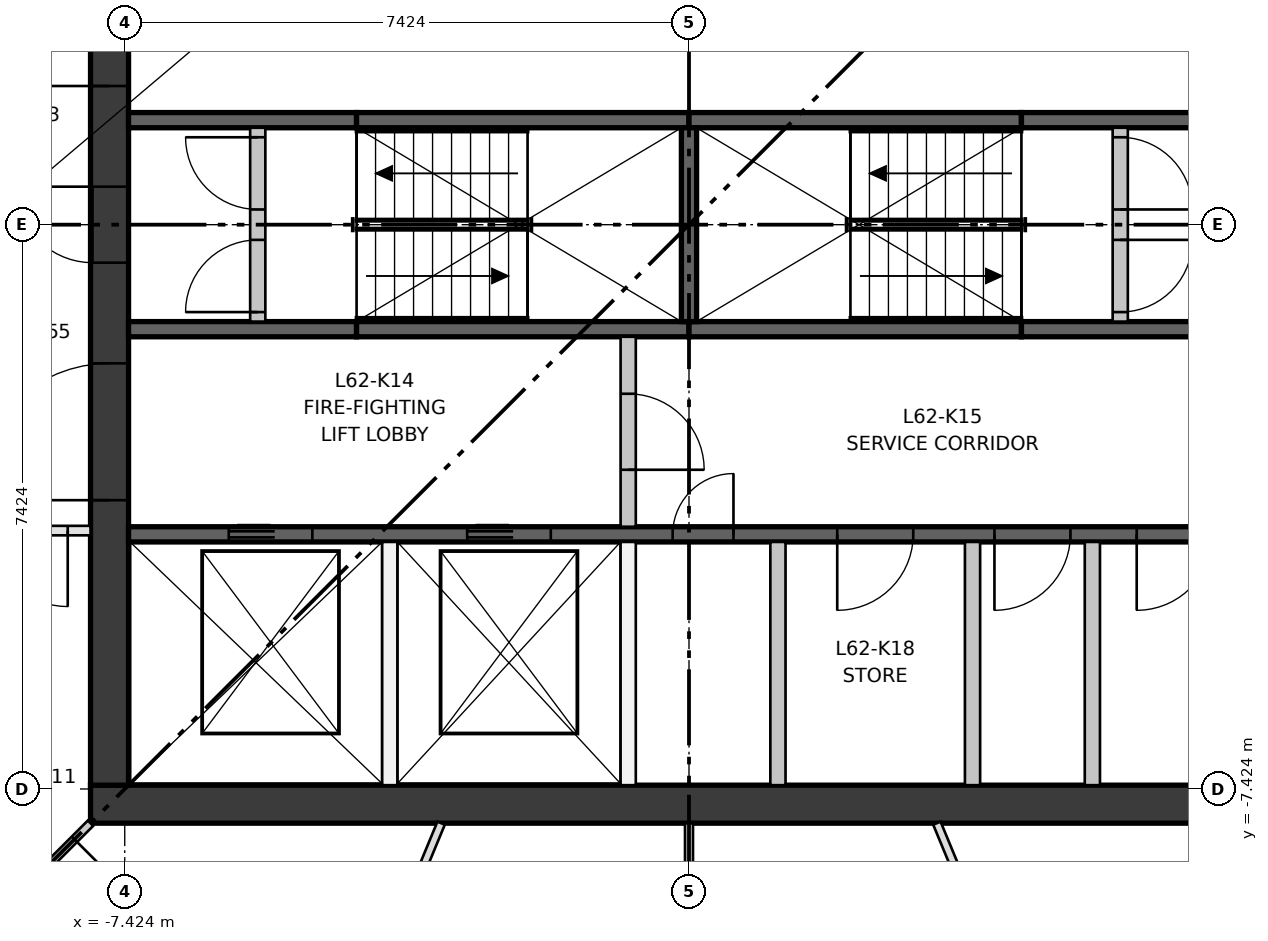
"""IFC4 building model, lengths in metres.
Left out: names, types, materials, properties, quantities, classifications, styles, units other than length and angle.
Written with IfcOpenShell. Run it as: python <this file> out.ifc"""

import sys

from ifc_helpers import new_model, si_unit, direction, frame, frame_2d, origin, place, context, subcontext, project, spatial, rectangle, extrude, element, fill, save


model = new_model("IFC4")
c1 = context("Model", 3, precision=1e-05, world=origin(), true_north=direction((0.0, 1.0)))
c2 = subcontext(c1, "Body", "Model", "MODEL_VIEW")
j1 = project(units=[si_unit("LENGTHUNIT", "METRE"), si_unit("PLANEANGLEUNIT", "RADIAN")], contexts=[c1])
p1 = place(None, origin())
s1 = spatial("IfcSite", under=j1, at=p1, CompositionType="ELEMENT")
p2 = place(p1, origin())
s2 = spatial("IfcBuilding", under=s1, at=p2, CompositionType="ELEMENT")
p3 = place(p2, frame((0.0, 0.0, 227.85)))
s3 = spatial("IfcBuildingStorey", under=s2, at=p3, CompositionType="ELEMENT", Elevation=227.85)
p4 = place(p3, frame((-7.874, -7.624, 0.0), z_axis=(0.0, 0.0, 1.0), x_axis=(1.0, 0.0, 0.0)))
e1 = element("IfcWall", 1, at=p4, inside=s3, PredefinedType="SHEAR", context=c2, shape_type="SweptSolid", body=[
    extrude(rectangle(XDim=15.748, YDim=0.5, at=frame_2d((7.874, 0.0))), origin(), (0.0, 0.0, 1.0), 3.35),
])
p5 = place(p3, frame((-7.624, -7.374, 0.0), z_axis=(0.0, 0.0, 1.0), x_axis=(0.0, 1.0, 0.0)))
e2 = element("IfcWall", 2, at=p5, inside=s3, PredefinedType="SHEAR", context=c2, shape_type="SweptSolid", body=[
    extrude(rectangle(XDim=14.748, YDim=0.5, at=frame_2d((7.374, 0.0))), origin(), (0.0, 0.0, 1.0), 3.35),
])
p6 = place(p5, frame((6.874, 0.0, 0.0)))
e3 = element("IfcOpeningElement", 3, at=p6, cuts=e2, PredefinedType="OPENING", context=c2, shape_type="SweptSolid", body=[
    extrude(rectangle(XDim=1.0, YDim=2.1, at=frame_2d((0.5, 1.05))), frame((0.0, 0.26, 0.0), z_axis=(0.0, -1.0, 0.0), x_axis=(1.0, 0.0, 0.0)), (0.0, 0.0, 1.0), 0.52),
])
p7 = place(p5, frame((3.75, 0.0, 0.0)))
e4 = element("IfcOpeningElement", 4, at=p7, cuts=e2, PredefinedType="OPENING", context=c2, shape_type="SweptSolid", body=[
    extrude(rectangle(XDim=1.8, YDim=2.1, at=frame_2d((0.9, 1.05))), frame((0.0, 0.26, 0.0), z_axis=(0.0, -1.0, 0.0), x_axis=(1.0, 0.0, 0.0)), (0.0, 0.0, 1.0), 0.52),
])
p8 = place(p5, frame((9.198, 0.0, 0.0)))
e5 = element("IfcOpeningElement", 5, at=p8, cuts=e2, PredefinedType="OPENING", context=c2, shape_type="SweptSolid", body=[
    extrude(rectangle(XDim=1.8, YDim=2.1, at=frame_2d((0.9, 1.05))), frame((0.0, 0.26, 0.0), z_axis=(0.0, -1.0, 0.0), x_axis=(1.0, 0.0, 0.0)), (0.0, 0.0, 1.0), 0.52),
])
p9 = place(p3, frame((-7.374, -4.074, 0.0), z_axis=(0.0, 0.0, 1.0), x_axis=(1.0, 0.0, 0.0)))
e6 = element("IfcWall", 6, at=p9, inside=s3, PredefinedType="SHEAR", context=c2, shape_type="SweptSolid", body=[
    extrude(rectangle(XDim=14.748, YDim=0.2, at=frame_2d((7.374, 0.0))), origin(), (0.0, 0.0, 1.0), 3.0),
])
p10 = place(p9, frame((1.319, 0.0, 0.0)))
e7 = element("IfcOpeningElement", 7, at=p10, cuts=e6, PredefinedType="OPENING", context=c2, shape_type="SweptSolid", body=[
    extrude(rectangle(XDim=1.1, YDim=2.1, at=frame_2d((0.55, 1.05))), frame((0.0, 0.11, 0.0), z_axis=(0.0, -1.0, 0.0), x_axis=(1.0, 0.0, 0.0)), (0.0, 0.0, 1.0), 0.22),
])
p11 = place(p9, frame((4.456, 0.0, 0.0)))
e8 = element("IfcOpeningElement", 8, at=p11, cuts=e6, PredefinedType="OPENING", context=c2, shape_type="SweptSolid", body=[
    extrude(rectangle(XDim=1.1, YDim=2.1, at=frame_2d((0.55, 1.05))), frame((0.0, 0.11, 0.0), z_axis=(0.0, -1.0, 0.0), x_axis=(1.0, 0.0, 0.0)), (0.0, 0.0, 1.0), 0.22),
])
p12 = place(p9, frame((7.159, 0.0, 0.0)))
e9 = element("IfcOpeningElement", 9, at=p12, cuts=e6, PredefinedType="OPENING", context=c2, shape_type="SweptSolid", body=[
    extrude(rectangle(XDim=0.8, YDim=2.1, at=frame_2d((0.4, 1.05))), frame((0.0, 0.11, 0.0), z_axis=(0.0, -1.0, 0.0), x_axis=(1.0, 0.0, 0.0)), (0.0, 0.0, 1.0), 0.22),
])
p13 = place(p9, frame((9.324, 0.0, 0.0)))
e10 = element("IfcOpeningElement", 10, at=p13, cuts=e6, PredefinedType="OPENING", context=c2, shape_type="SweptSolid", body=[
    extrude(rectangle(XDim=1.0, YDim=2.1, at=frame_2d((0.5, 1.05))), frame((0.0, 0.11, 0.0), z_axis=(0.0, -1.0, 0.0), x_axis=(1.0, 0.0, 0.0)), (0.0, 0.0, 1.0), 0.22),
])
p14 = place(p9, frame((11.393, 0.0, 0.0)))
e11 = element("IfcOpeningElement", 11, at=p14, cuts=e6, PredefinedType="OPENING", context=c2, shape_type="SweptSolid", body=[
    extrude(rectangle(XDim=1.0, YDim=2.1, at=frame_2d((0.5, 1.05))), frame((0.0, 0.11, 0.0), z_axis=(0.0, -1.0, 0.0), x_axis=(1.0, 0.0, 0.0)), (0.0, 0.0, 1.0), 0.22),
])
p15 = place(p9, frame((13.265, 0.0, 0.0)))
e12 = element("IfcOpeningElement", 12, at=p15, cuts=e6, PredefinedType="OPENING", context=c2, shape_type="SweptSolid", body=[
    extrude(rectangle(XDim=1.0, YDim=2.1, at=frame_2d((0.5, 1.05))), frame((0.0, 0.11, 0.0), z_axis=(0.0, -1.0, 0.0), x_axis=(1.0, 0.0, 0.0)), (0.0, 0.0, 1.0), 0.22),
])
p16 = place(p3, frame((-7.374, -1.375, 0.0), z_axis=(0.0, 0.0, 1.0), x_axis=(1.0, 0.0, 0.0)))
e13 = element("IfcWall", 13, at=p16, inside=s3, PredefinedType="SHEAR", context=c2, shape_type="SweptSolid", body=[
    extrude(rectangle(XDim=3.0, YDim=0.2, at=frame_2d((1.5, 0.0))), origin(), (0.0, 0.0, 1.0), 3.0),
])
for number, where, z_axis, x_axis in (
    (14, (-4.374, -1.375, 0.0), (0.0, 0.0, 1.0), (1.0, 0.0, 0.0)),
    (15, (0.0, -1.375, 0.0), (0.0, 0.0, 1.0), (1.0, 0.0, 0.0)),
):
    element("IfcWall", number, at=place(p3, frame(where, z_axis=z_axis, x_axis=x_axis)), inside=s3, PredefinedType="SHEAR", context=c2, shape_type="SweptSolid", body=[
        extrude(rectangle(XDim=4.374, YDim=0.2, at=frame_2d((2.187, 0.0))), origin(), (0.0, 0.0, 1.0), 3.0),
    ])
for number, where, z_axis, x_axis in (
    (16, (4.374, -1.375, 0.0), (0.0, 0.0, 1.0), (1.0, 0.0, 0.0)),
    (17, (-7.374, 1.375, 0.0), (0.0, 0.0, 1.0), (1.0, 0.0, 0.0)),
):
    element("IfcWall", number, at=place(p3, frame(where, z_axis=z_axis, x_axis=x_axis)), inside=s3, PredefinedType="SHEAR", context=c2, shape_type="SweptSolid", body=[
        extrude(rectangle(XDim=3.0, YDim=0.2, at=frame_2d((1.5, 0.0))), origin(), (0.0, 0.0, 1.0), 3.0),
    ])
for number, where, z_axis, x_axis in (
    (18, (-4.374, 1.375, 0.0), (0.0, 0.0, 1.0), (1.0, 0.0, 0.0)),
    (19, (0.0, 1.375, 0.0), (0.0, 0.0, 1.0), (1.0, 0.0, 0.0)),
):
    element("IfcWall", number, at=place(p3, frame(where, z_axis=z_axis, x_axis=x_axis)), inside=s3, PredefinedType="SHEAR", context=c2, shape_type="SweptSolid", body=[
        extrude(rectangle(XDim=4.374, YDim=0.2, at=frame_2d((2.187, 0.0))), origin(), (0.0, 0.0, 1.0), 3.0),
    ])
p17 = place(p3, frame((4.374, 1.375, 0.0), z_axis=(0.0, 0.0, 1.0), x_axis=(1.0, 0.0, 0.0)))
e20 = element("IfcWall", 20, at=p17, inside=s3, PredefinedType="SHEAR", context=c2, shape_type="SweptSolid", body=[
    extrude(rectangle(XDim=3.0, YDim=0.2, at=frame_2d((1.5, 0.0))), origin(), (0.0, 0.0, 1.0), 3.0),
])
p18 = place(p3, frame((0.0, -1.275, 0.0), z_axis=(0.0, 0.0, 1.0), x_axis=(0.0, 1.0, 0.0)))
e21 = element("IfcWall", 21, at=p18, inside=s3, PredefinedType="SHEAR", context=c2, shape_type="SweptSolid", body=[
    extrude(rectangle(XDim=2.55, YDim=0.2, at=frame_2d((1.275, 0.0))), origin(), (0.0, 0.0, 1.0), 3.0),
])
for number, where, z_axis, x_axis in (
    (22, (-3.937, -7.374, 0.0), (0.0, 0.0, 1.0), (0.0, 1.0, 0.0)),
    (23, (-0.8, -7.374, 0.0), (0.0, 0.0, 1.0), (0.0, 1.0, 0.0)),
):
    element("IfcWall", number, at=place(p3, frame(where, z_axis=z_axis, x_axis=x_axis)), inside=s3, PredefinedType="PARTITIONING", context=c2, shape_type="SweptSolid", body=[
        extrude(rectangle(XDim=3.2, YDim=0.2, at=frame_2d((1.6, 0.0))), origin(), (0.0, 0.0, 1.0), 3.0),
    ])
p19 = place(p3, frame((-0.8, -3.974, 0.0), z_axis=(0.0, 0.0, 1.0), x_axis=(0.0, 1.0, 0.0)))
e24 = element("IfcWall", 24, at=p19, inside=s3, PredefinedType="PARTITIONING", context=c2, shape_type="SweptSolid", body=[
    extrude(rectangle(XDim=2.499, YDim=0.2, at=frame_2d((1.25, 0.0))), origin(), (0.0, 0.0, 1.0), 3.0),
])
p20 = place(p19, frame((0.75, 0.0, 0.0)))
e25 = element("IfcOpeningElement", 25, at=p20, cuts=e24, PredefinedType="OPENING", context=c2, shape_type="SweptSolid", body=[
    extrude(rectangle(XDim=1.0, YDim=2.1, at=frame_2d((0.5, 1.05))), frame((0.0, 0.11, 0.0), z_axis=(0.0, -1.0, 0.0), x_axis=(1.0, 0.0, 0.0)), (0.0, 0.0, 1.0), 0.22),
])
for number, where, z_axis, x_axis in (
    (26, (1.17, -7.374, 0.0), (0.0, 0.0, 1.0), (0.0, 1.0, 0.0)),
    (27, (3.73, -7.374, 0.0), (0.0, 0.0, 1.0), (0.0, 1.0, 0.0)),
    (28, (5.307, -7.374, 0.0), (0.0, 0.0, 1.0), (0.0, 1.0, 0.0)),
):
    element("IfcWall", number, at=place(p3, frame(where, z_axis=z_axis, x_axis=x_axis)), inside=s3, PredefinedType="PARTITIONING", context=c2, shape_type="SweptSolid", body=[
        extrude(rectangle(XDim=3.2, YDim=0.2, at=frame_2d((1.6, 0.0))), origin(), (0.0, 0.0, 1.0), 3.0),
    ])
p21 = place(p3, frame((-5.674, -1.275, 0.0), z_axis=(0.0, 0.0, 1.0), x_axis=(0.0, 1.0, 0.0)))
e29 = element("IfcWall", 29, at=p21, inside=s3, PredefinedType="PARTITIONING", context=c2, shape_type="SweptSolid", body=[
    extrude(rectangle(XDim=2.55, YDim=0.2, at=frame_2d((1.275, 0.0))), origin(), (0.0, 0.0, 1.0), 3.0),
])
p22 = place(p21, frame((0.125, 0.0, 0.0)))
e30 = element("IfcOpeningElement", 30, at=p22, cuts=e29, PredefinedType="OPENING", context=c2, shape_type="SweptSolid", body=[
    extrude(rectangle(XDim=0.95, YDim=2.1, at=frame_2d((0.475, 1.05))), frame((0.0, 0.11, 0.0), z_axis=(0.0, -1.0, 0.0), x_axis=(1.0, 0.0, 0.0)), (0.0, 0.0, 1.0), 0.22),
])
p23 = place(p21, frame((1.475, 0.0, 0.0)))
e31 = element("IfcOpeningElement", 31, at=p23, cuts=e29, PredefinedType="OPENING", context=c2, shape_type="SweptSolid", body=[
    extrude(rectangle(XDim=0.95, YDim=2.1, at=frame_2d((0.475, 1.05))), frame((0.0, 0.11, 0.0), z_axis=(0.0, -1.0, 0.0), x_axis=(1.0, 0.0, 0.0)), (0.0, 0.0, 1.0), 0.22),
])
p24 = place(p3, frame((5.674, -1.275, 0.0), z_axis=(0.0, 0.0, 1.0), x_axis=(0.0, 1.0, 0.0)))
e32 = element("IfcWall", 32, at=p24, inside=s3, PredefinedType="PARTITIONING", context=c2, shape_type="SweptSolid", body=[
    extrude(rectangle(XDim=2.55, YDim=0.2, at=frame_2d((1.275, 0.0))), origin(), (0.0, 0.0, 1.0), 3.0),
])
p25 = place(p24, frame((0.125, 0.0, 0.0)))
e33 = element("IfcOpeningElement", 33, at=p25, cuts=e32, PredefinedType="OPENING", context=c2, shape_type="SweptSolid", body=[
    extrude(rectangle(XDim=0.95, YDim=2.1, at=frame_2d((0.475, 1.05))), frame((0.0, 0.11, 0.0), z_axis=(0.0, -1.0, 0.0), x_axis=(1.0, 0.0, 0.0)), (0.0, 0.0, 1.0), 0.22),
])
p26 = place(p24, frame((1.475, 0.0, 0.0)))
e34 = element("IfcOpeningElement", 34, at=p26, cuts=e32, PredefinedType="OPENING", context=c2, shape_type="SweptSolid", body=[
    extrude(rectangle(XDim=0.95, YDim=2.1, at=frame_2d((0.475, 1.05))), frame((0.0, 0.11, 0.0), z_axis=(0.0, -1.0, 0.0), x_axis=(1.0, 0.0, 0.0)), (0.0, 0.0, 1.0), 0.22),
])
p27 = place(p3, frame((-7.874, -4.024, 0.0), z_axis=(0.0, 0.0, 1.0), x_axis=(-1.0, 0.0, 0.0)))
e35 = element("IfcWall", 35, at=p27, inside=s3, PredefinedType="PARTITIONING", context=c2, shape_type="SweptSolid", body=[
    extrude(rectangle(XDim=1.948, YDim=0.125, at=frame_2d((0.974, 0.0))), origin(), (0.0, 0.0, 1.0), 3.0),
])
p28 = place(p27, frame((0.3, 0.0, 0.0)))
e36 = element("IfcOpeningElement", 36, at=p28, cuts=e35, PredefinedType="OPENING", context=c2, shape_type="SweptSolid", body=[
    extrude(rectangle(XDim=1.0, YDim=2.1, at=frame_2d((0.5, 1.05))), frame((0.0, 0.073, 0.0), z_axis=(0.0, -1.0, 0.0), x_axis=(1.0, 0.0, 0.0)), (0.0, 0.0, 1.0), 0.145),
])
p29 = place(p3, frame((-7.874, -7.874, 0.0), z_axis=(0.0, 0.0, 1.0), x_axis=(-0.707106781187, -0.707106781187, 0.0)))
e37 = element("IfcWall", 37, at=p29, inside=s3, PredefinedType="PARTITIONING", context=c2, shape_type="SweptSolid", body=[
    extrude(rectangle(XDim=2.835, YDim=0.1, at=frame_2d((1.417, 0.0))), origin(), (0.0, 0.0, 1.0), 3.0),
])
p30 = place(p29, frame((0.3, 0.0, 0.0)))
e38 = element("IfcOpeningElement", 38, at=p30, cuts=e37, PredefinedType="OPENING", context=c2, shape_type="SweptSolid", body=[
    extrude(rectangle(XDim=1.0, YDim=2.1, at=frame_2d((0.5, 1.05))), frame((0.0, 0.06, 0.0), z_axis=(0.0, -1.0, 0.0), x_axis=(1.0, 0.0, 0.0)), (0.0, 0.0, 1.0), 0.12),
])
p31 = place(p3, frame((-4.363, -10.532, 0.0), z_axis=(0.0, 0.0, 1.0), x_axis=(0.382686527355, 0.923878250519, 0.0)))
e39 = element("IfcWall", 39, at=p31, inside=s3, PredefinedType="PARTITIONING", context=c2, shape_type="SweptSolid", body=[
    extrude(rectangle(XDim=2.877, YDim=0.105, at=frame_2d((1.438, 0.0))), origin(), (0.0, 0.0, 1.0), 3.0),
])
p32 = place(p3, frame((0.0, -11.4, 0.0), z_axis=(0.0, 0.0, 1.0), x_axis=(0.0, 1.0, 0.0)))
e40 = element("IfcWall", 40, at=p32, inside=s3, PredefinedType="PARTITIONING", context=c2, shape_type="SweptSolid", body=[
    extrude(rectangle(XDim=3.526, YDim=0.105, at=frame_2d((1.763, 0.0))), origin(), (0.0, 0.0, 1.0), 3.0),
])
p33 = place(p32, frame((1.3, 0.0, 0.0)))
e41 = element("IfcOpeningElement", 41, at=p33, cuts=e40, PredefinedType="OPENING", context=c2, shape_type="SweptSolid", body=[
    extrude(rectangle(XDim=1.0, YDim=2.1, at=frame_2d((0.5, 1.05))), frame((0.0, 0.062, 0.0), z_axis=(0.0, -1.0, 0.0), x_axis=(1.0, 0.0, 0.0)), (0.0, 0.0, 1.0), 0.125),
])
p34 = place(p3, frame((4.363, -10.532, 0.0), z_axis=(0.0, 0.0, 1.0), x_axis=(-0.382686527355, 0.923878250519, 0.0)))
e42 = element("IfcWall", 42, at=p34, inside=s3, PredefinedType="PARTITIONING", context=c2, shape_type="SweptSolid", body=[
    extrude(rectangle(XDim=2.877, YDim=0.105, at=frame_2d((1.438, 0.0))), origin(), (0.0, 0.0, 1.0), 3.0),
])
p35 = place(p34, frame((0.9, 0.0, 0.0)))
e43 = element("IfcOpeningElement", 43, at=p35, cuts=e42, PredefinedType="OPENING", context=c2, shape_type="SweptSolid", body=[
    extrude(rectangle(XDim=1.0, YDim=2.1, at=frame_2d((0.5, 1.05))), frame((0.0, 0.062, 0.0), z_axis=(0.0, -1.0, 0.0), x_axis=(1.0, 0.0, 0.0)), (0.0, 0.0, 1.0), 0.125),
])
p36 = place(p10, origin())
e44 = element("IfcDoor", 44, at=p36, inside=s3, OperationType="DOUBLE_DOOR_SLIDING", PredefinedType="DOOR", context=c2, shape_type="SweptSolid", body=[
    extrude(rectangle(XDim=1.1, YDim=2.1, at=frame_2d((0.55, 1.05))), frame((0.0, 0.025, 0.0), z_axis=(0.0, -1.0, 0.0), x_axis=(1.0, 0.0, 0.0)), (0.0, 0.0, 1.0), 0.05),
])
fill(e7, e44)
p37 = place(p11, origin())
e45 = element("IfcDoor", 45, at=p37, inside=s3, OperationType="DOUBLE_DOOR_SLIDING", PredefinedType="DOOR", context=c2, shape_type="SweptSolid", body=[
    extrude(rectangle(XDim=1.1, YDim=2.1, at=frame_2d((0.55, 1.05))), frame((0.0, 0.025, 0.0), z_axis=(0.0, -1.0, 0.0), x_axis=(1.0, 0.0, 0.0)), (0.0, 0.0, 1.0), 0.05),
])
fill(e8, e45)
p38 = place(p22, origin())
e46 = element("IfcDoor", 46, at=p38, inside=s3, OperationType="SINGLE_SWING_LEFT", PredefinedType="DOOR", context=c2, shape_type="SweptSolid", body=[
    extrude(rectangle(XDim=0.95, YDim=2.1, at=frame_2d((0.475, 1.05))), frame((0.0, 0.025, 0.0), z_axis=(0.0, -1.0, 0.0), x_axis=(1.0, 0.0, 0.0)), (0.0, 0.0, 1.0), 0.05),
])
fill(e30, e46)
p39 = place(p23, origin())
e47 = element("IfcDoor", 47, at=p39, inside=s3, OperationType="SINGLE_SWING_RIGHT", PredefinedType="DOOR", context=c2, shape_type="SweptSolid", body=[
    extrude(rectangle(XDim=0.95, YDim=2.1, at=frame_2d((0.475, 1.05))), frame((0.0, 0.025, 0.0), z_axis=(0.0, -1.0, 0.0), x_axis=(1.0, 0.0, 0.0)), (0.0, 0.0, 1.0), 0.05),
])
fill(e31, e47)
p40 = place(p25, frame((0.95, 0.0, 0.0), z_axis=(0.0, 0.0, 1.0), x_axis=(-1.0, 0.0, 0.0)))
e48 = element("IfcDoor", 48, at=p40, inside=s3, OperationType="SINGLE_SWING_RIGHT", PredefinedType="DOOR", context=c2, shape_type="SweptSolid", body=[
    extrude(rectangle(XDim=0.95, YDim=2.1, at=frame_2d((0.475, 1.05))), frame((0.0, 0.025, 0.0), z_axis=(0.0, -1.0, 0.0), x_axis=(1.0, 0.0, 0.0)), (0.0, 0.0, 1.0), 0.05),
])
fill(e33, e48)
p41 = place(p26, frame((0.95, 0.0, 0.0), z_axis=(0.0, 0.0, 1.0), x_axis=(-1.0, 0.0, 0.0)))
e49 = element("IfcDoor", 49, at=p41, inside=s3, OperationType="SINGLE_SWING_LEFT", PredefinedType="DOOR", context=c2, shape_type="SweptSolid", body=[
    extrude(rectangle(XDim=0.95, YDim=2.1, at=frame_2d((0.475, 1.05))), frame((0.0, 0.025, 0.0), z_axis=(0.0, -1.0, 0.0), x_axis=(1.0, 0.0, 0.0)), (0.0, 0.0, 1.0), 0.05),
])
fill(e34, e49)
p42 = place(p20, frame((1.0, 0.0, 0.0), z_axis=(0.0, 0.0, 1.0), x_axis=(-1.0, 0.0, 0.0)))
e50 = element("IfcDoor", 50, at=p42, inside=s3, OperationType="SINGLE_SWING_LEFT", PredefinedType="DOOR", context=c2, shape_type="SweptSolid", body=[
    extrude(rectangle(XDim=1.0, YDim=2.1, at=frame_2d((0.5, 1.05))), frame((0.0, 0.025, 0.0), z_axis=(0.0, -1.0, 0.0), x_axis=(1.0, 0.0, 0.0)), (0.0, 0.0, 1.0), 0.05),
])
fill(e25, e50)
p43 = place(p12, origin())
e51 = element("IfcDoor", 51, at=p43, inside=s3, OperationType="SINGLE_SWING_RIGHT", PredefinedType="DOOR", context=c2, shape_type="SweptSolid", body=[
    extrude(rectangle(XDim=0.8, YDim=2.1, at=frame_2d((0.4, 1.05))), frame((0.0, 0.025, 0.0), z_axis=(0.0, -1.0, 0.0), x_axis=(1.0, 0.0, 0.0)), (0.0, 0.0, 1.0), 0.05),
])
fill(e9, e51)
p44 = place(p13, frame((1.0, 0.0, 0.0), z_axis=(0.0, 0.0, 1.0), x_axis=(-1.0, 0.0, 0.0)))
e52 = element("IfcDoor", 52, at=p44, inside=s3, OperationType="SINGLE_SWING_LEFT", PredefinedType="DOOR", context=c2, shape_type="SweptSolid", body=[
    extrude(rectangle(XDim=1.0, YDim=2.1, at=frame_2d((0.5, 1.05))), frame((0.0, 0.025, 0.0), z_axis=(0.0, -1.0, 0.0), x_axis=(1.0, 0.0, 0.0)), (0.0, 0.0, 1.0), 0.05),
])
fill(e10, e52)
p45 = place(p14, frame((1.0, 0.0, 0.0), z_axis=(0.0, 0.0, 1.0), x_axis=(-1.0, 0.0, 0.0)))
e53 = element("IfcDoor", 53, at=p45, inside=s3, OperationType="SINGLE_SWING_LEFT", PredefinedType="DOOR", context=c2, shape_type="SweptSolid", body=[
    extrude(rectangle(XDim=1.0, YDim=2.1, at=frame_2d((0.5, 1.05))), frame((0.0, 0.025, 0.0), z_axis=(0.0, -1.0, 0.0), x_axis=(1.0, 0.0, 0.0)), (0.0, 0.0, 1.0), 0.05),
])
fill(e11, e53)
p46 = place(p15, frame((1.0, 0.0, 0.0), z_axis=(0.0, 0.0, 1.0), x_axis=(-1.0, 0.0, 0.0)))
e54 = element("IfcDoor", 54, at=p46, inside=s3, OperationType="SINGLE_SWING_LEFT", PredefinedType="DOOR", context=c2, shape_type="SweptSolid", body=[
    extrude(rectangle(XDim=1.0, YDim=2.1, at=frame_2d((0.5, 1.05))), frame((0.0, 0.025, 0.0), z_axis=(0.0, -1.0, 0.0), x_axis=(1.0, 0.0, 0.0)), (0.0, 0.0, 1.0), 0.05),
])
fill(e12, e54)
p47 = place(p6, origin())
e55 = element("IfcDoor", 55, at=p47, inside=s3, OperationType="SINGLE_SWING_RIGHT", PredefinedType="DOOR", context=c2, shape_type="SweptSolid", body=[
    extrude(rectangle(XDim=1.0, YDim=2.1, at=frame_2d((0.5, 1.05))), frame((0.0, 0.25, 0.0), z_axis=(0.0, -1.0, 0.0), x_axis=(1.0, 0.0, 0.0)), (0.0, 0.0, 1.0), 0.05),
])
fill(e3, e55)
p48 = place(p7, origin())
e56 = element("IfcDoor", 56, at=p48, inside=s3, OperationType="DOUBLE_DOOR_SINGLE_SWING", PredefinedType="DOOR", context=c2, shape_type="SweptSolid", body=[
    extrude(rectangle(XDim=1.8, YDim=2.1, at=frame_2d((0.9, 1.05))), frame((0.0, 0.025, 0.0), z_axis=(0.0, -1.0, 0.0), x_axis=(1.0, 0.0, 0.0)), (0.0, 0.0, 1.0), 0.05),
])
fill(e4, e56)
p49 = place(p8, origin())
e57 = element("IfcDoor", 57, at=p49, inside=s3, OperationType="DOUBLE_DOOR_SINGLE_SWING", PredefinedType="DOOR", context=c2, shape_type="SweptSolid", body=[
    extrude(rectangle(XDim=1.8, YDim=2.1, at=frame_2d((0.9, 1.05))), frame((0.0, 0.025, 0.0), z_axis=(0.0, -1.0, 0.0), x_axis=(1.0, 0.0, 0.0)), (0.0, 0.0, 1.0), 0.05),
])
fill(e5, e57)
p50 = place(p28, origin())
e58 = element("IfcDoor", 58, at=p50, inside=s3, OperationType="SINGLE_SWING_LEFT", PredefinedType="DOOR", context=c2, shape_type="SweptSolid", body=[
    extrude(rectangle(XDim=1.0, YDim=2.1, at=frame_2d((0.5, 1.05))), frame((0.0, 0.025, 0.0), z_axis=(0.0, -1.0, 0.0), x_axis=(1.0, 0.0, 0.0)), (0.0, 0.0, 1.0), 0.05),
])
fill(e36, e58)
p51 = place(p30, origin())
e59 = element("IfcDoor", 59, at=p51, inside=s3, OperationType="SINGLE_SWING_LEFT", PredefinedType="DOOR", context=c2, shape_type="SweptSolid", body=[
    extrude(rectangle(XDim=1.0, YDim=2.1, at=frame_2d((0.5, 1.05))), frame((0.0, 0.025, 0.0), z_axis=(0.0, -1.0, 0.0), x_axis=(1.0, 0.0, 0.0)), (0.0, 0.0, 1.0), 0.05),
])
fill(e38, e59)
save(model, sys.argv[1])
